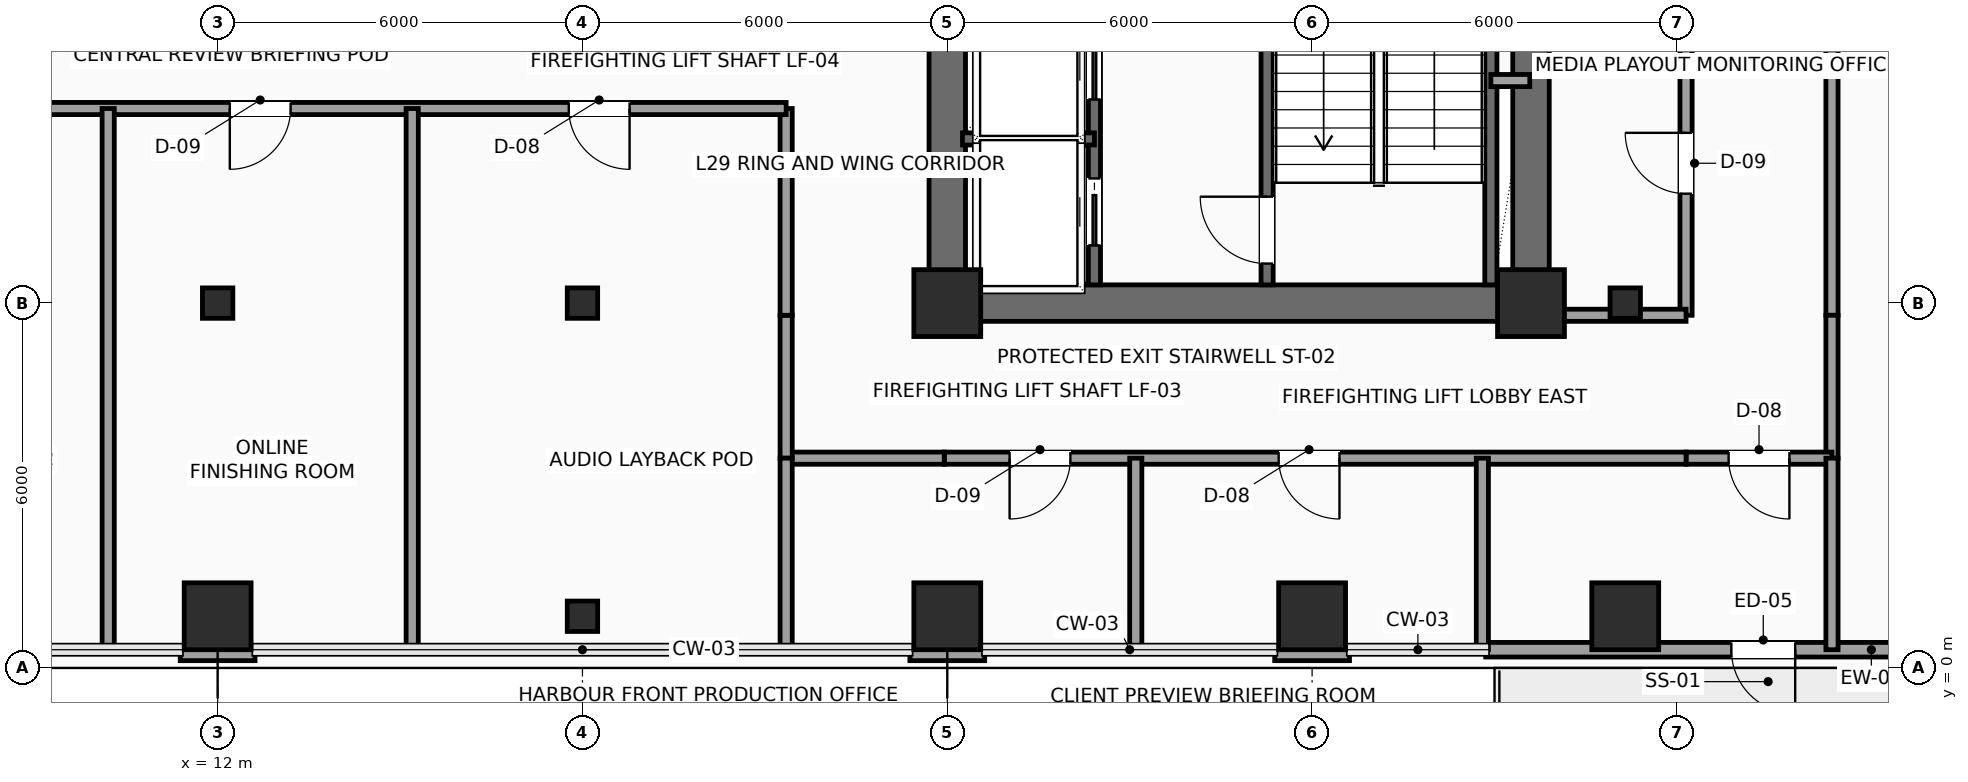
"""IFC4 building model, lengths in metres.
Left out: names, types, materials, properties, quantities, classifications, styles, units other than length and angle.
Written with IfcOpenShell. Run it as: python <this file> out.ifc"""

import sys

from ifc_helpers import new_model, si_unit, direction, frame, frame_2d, origin, origin_2d, place, context, subcontext, project, spatial, rectangle, hollow_rectangle, extrude, element, fill, save


model = new_model("IFC4")
c1 = context("Model", 3, precision=1e-05, world=origin(), true_north=direction((0.0, 1.0)))
c2 = subcontext(c1, "Body", "Model", "MODEL_VIEW")
j1 = project(units=[si_unit("LENGTHUNIT", "METRE"), si_unit("PLANEANGLEUNIT", "RADIAN")], contexts=[c1])
p1 = place(None, origin())
s1 = spatial("IfcSite", under=j1, at=p1, CompositionType="ELEMENT")
p2 = place(p1, origin())
s2 = spatial("IfcBuilding", under=s1, at=p2, CompositionType="ELEMENT")
p3 = place(p2, frame((0.0, 0.0, 123.15)))
s3 = spatial("IfcBuildingStorey", under=s2, at=p3, CompositionType="ELEMENT", Elevation=123.15)
for number, where, z_axis, x_axis in (
    (1, (24.0, 6.0, 0.0), (0.0, 0.0, 1.0), (1.0, 0.0, 0.0)),
    (2, (33.6, 6.0, 0.0), (0.0, 0.0, 1.0), (1.0, 0.0, 0.0)),
    (3, (12.0, 0.85, 0.0), (0.0, 0.0, 1.0), (1.0, 0.0, 0.0)),
):
    element("IfcColumn", number, at=place(p3, frame(where, z_axis=z_axis, x_axis=x_axis)), inside=s3, PredefinedType="COLUMN", context=c2, shape_type="SweptSolid", body=[
        extrude(rectangle(XDim=1.1, YDim=1.1, at=origin_2d()), origin(), (0.0, 0.0, 1.0), 3.75),
    ])
for number, where, z_axis, x_axis in (
    (4, (12.0, 6.0, 0.0), (0.0, 0.0, 1.0), (1.0, 0.0, 0.0)),
    (5, (18.0, 0.85, 0.0), (0.0, 0.0, 1.0), (1.0, 0.0, 0.0)),
    (6, (18.0, 6.0, 0.0), (0.0, 0.0, 1.0), (1.0, 0.0, 0.0)),
):
    element("IfcColumn", number, at=place(p3, frame(where, z_axis=z_axis, x_axis=x_axis)), inside=s3, PredefinedType="COLUMN", context=c2, shape_type="SweptSolid", body=[
        extrude(hollow_rectangle(XDim=0.5, YDim=0.5, WallThickness=0.025, InnerFilletRadius=0.025, OuterFilletRadius=0.04, at=origin_2d()), origin(), (0.0, 0.0, 1.0), 3.75),
    ])
for number, where, z_axis, x_axis in (
    (7, (24.0, 0.85, 0.0), (0.0, 0.0, 1.0), (1.0, 0.0, 0.0)),
    (8, (30.0, 0.85, 0.0), (0.0, 0.0, 1.0), (1.0, 0.0, 0.0)),
    (9, (35.15, 0.85, 0.0), (0.0, 0.0, 1.0), (1.0, 0.0, 0.0)),
):
    element("IfcColumn", number, at=place(p3, frame(where, z_axis=z_axis, x_axis=x_axis)), inside=s3, PredefinedType="COLUMN", context=c2, shape_type="SweptSolid", body=[
        extrude(rectangle(XDim=1.1, YDim=1.1, at=origin_2d()), origin(), (0.0, 0.0, 1.0), 3.75),
    ])
p4 = place(p3, frame((35.15, 6.0, 0.0), z_axis=(0.0, 0.0, 1.0), x_axis=(1.0, 0.0, 0.0)))
e10 = element("IfcColumn", 10, at=p4, inside=s3, PredefinedType="COLUMN", context=c2, shape_type="SweptSolid", body=[
    extrude(hollow_rectangle(XDim=0.5, YDim=0.5, WallThickness=0.025, InnerFilletRadius=0.025, OuterFilletRadius=0.04, at=origin_2d()), origin(), (0.0, 0.0, 1.0), 3.75),
])
p5 = place(p3, frame((42.145, 0.3, 0.0), z_axis=(0.0, 0.0, 1.0), x_axis=(-1.0, 0.0, 0.0)))
e11 = element("IfcWall", 11, at=p5, inside=s3, PredefinedType="SOLIDWALL", context=c2, shape_type="SweptSolid", body=[
    extrude(rectangle(XDim=9.29, YDim=0.24, at=frame_2d((4.645, 0.0))), origin(), (0.0, 0.0, 1.0), 3.525),
])
p6 = place(p5, frame((4.2, 0.0, 0.0)))
e12 = element("IfcOpeningElement", 12, at=p6, cuts=e11, PredefinedType="OPENING", context=c2, shape_type="SweptSolid", body=[
    extrude(rectangle(XDim=1.05, YDim=2.2, at=frame_2d((0.525, 1.1))), frame((0.0, 0.13, 0.0), z_axis=(0.0, -1.0, 0.0), x_axis=(1.0, 0.0, 0.0)), (0.0, 0.0, 1.0), 0.26),
])
for number, where, z_axis, x_axis in (
    (13, (30.615, 0.24, 0.0), (0.0, 0.0, 1.0), (-1.0, 0.0, 0.0)),
    (14, (24.615, 0.24, 0.0), (0.0, 0.0, 1.0), (-1.0, 0.0, 0.0)),
    (15, (12.615, 0.24, 0.0), (0.0, 0.0, 1.0), (-1.0, 0.0, 0.0)),
):
    element("IfcWall", number, at=place(p3, frame(where, z_axis=z_axis, x_axis=x_axis)), inside=s3, PredefinedType="SOLIDWALL", context=c2, shape_type="SweptSolid", body=[
        extrude(rectangle(XDim=1.23, YDim=0.24, at=frame_2d((0.615, 0.0))), origin(), (0.0, 0.0, 1.0), 3.525),
    ])
p7 = place(p3, frame((24.0, 6.0, 0.0), z_axis=(0.0, 0.0, 1.0), x_axis=(1.0, 0.0, 0.0)))
e16 = element("IfcWall", 16, at=p7, inside=s3, PredefinedType="SHEAR", context=c2, shape_type="SweptSolid", body=[
    extrude(rectangle(XDim=9.6, YDim=0.6, at=frame_2d((4.8, 0.0))), origin(), (0.0, 0.0, 1.0), 3.525),
])
p8 = place(p3, frame((24.0, 6.0, 0.0), z_axis=(0.0, 0.0, 1.0), x_axis=(0.0, 1.0, 0.0)))
e17 = element("IfcWall", 17, at=p8, inside=s3, PredefinedType="SHEAR", context=c2, shape_type="SweptSolid", body=[
    extrude(rectangle(XDim=12.0, YDim=0.6, at=frame_2d((6.0, 0.0))), origin(), (0.0, 0.0, 1.0), 3.525),
])
p9 = place(p8, frame((7.15, 0.0, 0.0)))
e18 = element("IfcOpeningElement", 18, at=p9, cuts=e17, PredefinedType="OPENING", context=c2, shape_type="SweptSolid", body=[
    extrude(rectangle(XDim=1.6, YDim=2.3, at=frame_2d((0.8, 1.15))), frame((0.0, 0.31, 0.0), z_axis=(0.0, -1.0, 0.0), x_axis=(1.0, 0.0, 0.0)), (0.0, 0.0, 1.0), 0.62),
])
p10 = place(p3, frame((33.6, 6.0, 0.0), z_axis=(0.0, 0.0, 1.0), x_axis=(0.0, 1.0, 0.0)))
e19 = element("IfcWall", 19, at=p10, inside=s3, PredefinedType="SHEAR", context=c2, shape_type="SweptSolid", body=[
    extrude(rectangle(XDim=12.0, YDim=0.6, at=frame_2d((6.0, 0.0))), origin(), (0.0, 0.0, 1.0), 3.525),
])
p11 = place(p10, frame((10.15, 0.0, 0.0)))
e20 = element("IfcOpeningElement", 20, at=p11, cuts=e19, PredefinedType="OPENING", context=c2, shape_type="SweptSolid", body=[
    extrude(rectangle(XDim=0.9, YDim=2.15, at=frame_2d((0.45, 1.075))), frame((0.0, 0.31, 0.0), z_axis=(0.0, -1.0, 0.0), x_axis=(1.0, 0.0, 0.0)), (0.0, 0.0, 1.0), 0.62),
])
p12 = place(p3, frame((29.26, 6.3, 0.0), z_axis=(0.0, 0.0, 1.0), x_axis=(0.0, 1.0, 0.0)))
e21 = element("IfcWall", 21, at=p12, inside=s3, PredefinedType="SHEAR", context=c2, shape_type="SweptSolid", body=[
    extrude(rectangle(XDim=8.88, YDim=0.2, at=frame_2d((4.44, 0.0))), origin(), (0.0, 0.0, 1.0), 3.525),
])
p13 = place(p12, frame((0.35, 0.0, 0.0)))
e22 = element("IfcOpeningElement", 22, at=p13, cuts=e21, PredefinedType="OPENING", context=c2, shape_type="SweptSolid", body=[
    extrude(rectangle(XDim=1.1, YDim=2.2, at=frame_2d((0.55, 1.1))), frame((0.0, 0.11, 0.0), z_axis=(0.0, -1.0, 0.0), x_axis=(1.0, 0.0, 0.0)), (0.0, 0.0, 1.0), 0.22),
])
p14 = place(p3, frame((32.94, 6.3, 0.0), z_axis=(0.0, 0.0, 1.0), x_axis=(0.0, 1.0, 0.0)))
e23 = element("IfcWall", 23, at=p14, inside=s3, PredefinedType="SHEAR", context=c2, shape_type="SweptSolid", body=[
    extrude(rectangle(XDim=8.88, YDim=0.2, at=frame_2d((4.44, 0.0))), origin(), (0.0, 0.0, 1.0), 3.525),
])
p15 = place(p3, frame((26.42, 6.3, 0.0), z_axis=(0.0, 0.0, 1.0), x_axis=(0.0, 1.0, 0.0)))
e24 = element("IfcWall", 24, at=p15, inside=s3, PredefinedType="SHEAR", context=c2, shape_type="SweptSolid", body=[
    extrude(rectangle(XDim=4.95, YDim=0.2, at=frame_2d((2.475, 0.0))), origin(), (0.0, 0.0, 1.0), 3.525),
])
p16 = place(p15, frame((0.65, 0.0, 0.0)))
e25 = element("IfcOpeningElement", 25, at=p16, cuts=e24, PredefinedType="OPENING", context=c2, shape_type="SweptSolid", body=[
    extrude(rectangle(XDim=1.1, YDim=2.2, at=frame_2d((0.55, 1.1))), frame((0.0, 0.11, 0.0), z_axis=(0.0, -1.0, 0.0), x_axis=(1.0, 0.0, 0.0)), (0.0, 0.0, 1.0), 0.22),
])
p17 = place(p15, frame((3.05, 0.0, 0.0)))
e26 = element("IfcOpeningElement", 26, at=p17, cuts=e24, PredefinedType="OPENING", context=c2, shape_type="SweptSolid", body=[
    extrude(rectangle(XDim=1.1, YDim=2.2, at=frame_2d((0.55, 1.1))), frame((0.0, 0.11, 0.0), z_axis=(0.0, -1.0, 0.0), x_axis=(1.0, 0.0, 0.0)), (0.0, 0.0, 1.0), 0.22),
])
p18 = place(p3, frame((24.25, 8.7, 0.0), z_axis=(0.0, 0.0, 1.0), x_axis=(1.0, 0.0, 0.0)))
e27 = element("IfcWall", 27, at=p18, inside=s3, PredefinedType="SHEAR", context=c2, shape_type="SweptSolid", body=[
    extrude(rectangle(XDim=2.17, YDim=0.2, at=frame_2d((1.085, 0.0))), origin(), (0.0, 0.0, 1.0), 3.525),
])
p19 = place(p3, frame((32.94, 9.66, 0.0), z_axis=(0.0, 0.0, 1.0), x_axis=(1.0, 0.0, 0.0)))
e28 = element("IfcWall", 28, at=p19, inside=s3, PredefinedType="SOLIDWALL", context=c2, shape_type="SweptSolid", body=[
    extrude(rectangle(XDim=0.64, YDim=0.2, at=frame_2d((0.32, 0.0))), origin(), (0.0, 0.0, 1.0), 3.525),
])
p20 = place(p3, frame((36.15, 5.8, 0.0), z_axis=(0.0, 0.0, 1.0), x_axis=(0.0, 1.0, 0.0)))
e29 = element("IfcWall", 29, at=p20, inside=s3, PredefinedType="SOLIDWALL", context=c2, shape_type="SweptSolid", body=[
    extrude(rectangle(XDim=10.08, YDim=0.2, at=frame_2d((5.04, 0.0))), origin(), (0.0, 0.0, 1.0), 3.525),
])
p21 = place(p20, frame((2.0, 0.0, 0.0)))
e30 = element("IfcOpeningElement", 30, at=p21, cuts=e29, PredefinedType="OPENING", context=c2, shape_type="SweptSolid", body=[
    extrude(rectangle(XDim=1.0, YDim=2.2, at=frame_2d((0.5, 1.1))), frame((0.0, 0.11, 0.0), z_axis=(0.0, -1.0, 0.0), x_axis=(1.0, 0.0, 0.0)), (0.0, 0.0, 1.0), 0.22),
])
p22 = place(p20, frame((7.04, 0.0, 0.0)))
e31 = element("IfcOpeningElement", 31, at=p22, cuts=e29, PredefinedType="OPENING", context=c2, shape_type="SweptSolid", body=[
    extrude(rectangle(XDim=1.0, YDim=2.2, at=frame_2d((0.5, 1.1))), frame((0.0, 0.11, 0.0), z_axis=(0.0, -1.0, 0.0), x_axis=(1.0, 0.0, 0.0)), (0.0, 0.0, 1.0), 0.22),
])
p23 = place(p3, frame((38.55, 14.2, 0.0), z_axis=(0.0, 0.0, 1.0), x_axis=(0.0, -1.0, 0.0)))
e32 = element("IfcWall", 32, at=p23, inside=s3, PredefinedType="SOLIDWALL", context=c2, shape_type="SweptSolid", body=[
    extrude(rectangle(XDim=8.4, YDim=0.2, at=frame_2d((4.2, 0.0))), origin(), (0.0, 0.0, 1.0), 3.525),
])
p24 = place(p3, frame((38.55, 5.8, 0.0), z_axis=(0.0, 0.0, 1.0), x_axis=(0.0, -1.0, 0.0)))
e33 = element("IfcWall", 33, at=p24, inside=s3, PredefinedType="SOLIDWALL", context=c2, shape_type="SweptSolid", body=[
    extrude(rectangle(XDim=2.35, YDim=0.2, at=frame_2d((1.175, 0.0))), origin(), (0.0, 0.0, 1.0), 3.525),
])
p25 = place(p3, frame((38.55, 3.45, 0.0), z_axis=(0.0, 0.0, 1.0), x_axis=(-1.0, 0.0, 0.0)))
e34 = element("IfcWall", 34, at=p25, inside=s3, PredefinedType="SOLIDWALL", context=c2, shape_type="SweptSolid", body=[
    extrude(rectangle(XDim=2.4, YDim=0.2, at=frame_2d((1.2, 0.0))), origin(), (0.0, 0.0, 1.0), 3.067),
])
p26 = place(p25, frame((0.7, 0.0, 0.0)))
e35 = element("IfcOpeningElement", 35, at=p26, cuts=e34, PredefinedType="OPENING", context=c2, shape_type="SweptSolid", body=[
    extrude(rectangle(XDim=1.0, YDim=2.2, at=frame_2d((0.5, 1.1))), frame((0.0, 0.11, 0.0), z_axis=(0.0, -1.0, 0.0), x_axis=(1.0, 0.0, 0.0)), (0.0, 0.0, 1.0), 0.22),
])
p27 = place(p3, frame((36.15, 3.45, 0.0), z_axis=(0.0, 0.0, 1.0), x_axis=(-1.0, 0.0, 0.0)))
e36 = element("IfcWall", 36, at=p27, inside=s3, PredefinedType="SOLIDWALL", context=c2, shape_type="SweptSolid", body=[
    extrude(rectangle(XDim=12.2, YDim=0.2, at=frame_2d((6.1, 0.0))), origin(), (0.0, 0.0, 1.0), 3.067),
])
p28 = place(p27, frame((10.125, 0.0, 0.0)))
e37 = element("IfcOpeningElement", 37, at=p28, cuts=e36, PredefinedType="OPENING", context=c2, shape_type="SweptSolid", body=[
    extrude(rectangle(XDim=1.0, YDim=2.2, at=frame_2d((0.5, 1.1))), frame((0.0, 0.11, 0.0), z_axis=(0.0, -1.0, 0.0), x_axis=(1.0, 0.0, 0.0)), (0.0, 0.0, 1.0), 0.22),
])
p29 = place(p27, frame((5.7, 0.0, 0.0)))
e38 = element("IfcOpeningElement", 38, at=p29, cuts=e36, PredefinedType="OPENING", context=c2, shape_type="SweptSolid", body=[
    extrude(rectangle(XDim=1.0, YDim=2.2, at=frame_2d((0.5, 1.1))), frame((0.0, 0.11, 0.0), z_axis=(0.0, -1.0, 0.0), x_axis=(1.0, 0.0, 0.0)), (0.0, 0.0, 1.0), 0.22),
])
p30 = place(p3, frame((23.95, 3.45, 0.0), z_axis=(0.0, 0.0, 1.0), x_axis=(-1.0, 0.0, 0.0)))
e39 = element("IfcWall", 39, at=p30, inside=s3, PredefinedType="SOLIDWALL", context=c2, shape_type="SweptSolid", body=[
    extrude(rectangle(XDim=2.6, YDim=0.2, at=frame_2d((1.3, 0.0))), origin(), (0.0, 0.0, 1.0), 3.067),
])
p31 = place(p3, frame((21.35, 3.45, 0.0), z_axis=(0.0, 0.0, 1.0), x_axis=(0.0, 1.0, 0.0)))
e40 = element("IfcWall", 40, at=p31, inside=s3, PredefinedType="SOLIDWALL", context=c2, shape_type="SweptSolid", body=[
    extrude(rectangle(XDim=2.35, YDim=0.2, at=frame_2d((1.175, 0.0))), origin(), (0.0, 0.0, 1.0), 3.525),
])
p32 = place(p3, frame((21.35, 5.8, 0.0), z_axis=(0.0, 0.0, 1.0), x_axis=(0.0, 1.0, 0.0)))
e41 = element("IfcWall", 41, at=p32, inside=s3, PredefinedType="SOLIDWALL", context=c2, shape_type="SweptSolid", body=[
    extrude(rectangle(XDim=3.4, YDim=0.2, at=frame_2d((1.7, 0.0))), origin(), (0.0, 0.0, 1.0), 3.525),
])
p33 = place(p3, frame((21.35, 9.2, 0.0), z_axis=(0.0, 0.0, 1.0), x_axis=(-1.0, 0.0, 0.0)))
e42 = element("IfcWall", 42, at=p33, inside=s3, PredefinedType="SOLIDWALL", context=c2, shape_type="SweptSolid", body=[
    extrude(rectangle(XDim=18.15, YDim=0.2, at=frame_2d((9.075, 0.0))), origin(), (0.0, 0.0, 1.0), 3.067),
])
p34 = place(p33, frame((16.65, 0.0, 0.0)))
e43 = element("IfcOpeningElement", 43, at=p34, cuts=e42, PredefinedType="OPENING", context=c2, shape_type="SweptSolid", body=[
    extrude(rectangle(XDim=1.0, YDim=2.2, at=frame_2d((0.5, 1.1))), frame((0.0, 0.11, 0.0), z_axis=(0.0, -1.0, 0.0), x_axis=(1.0, 0.0, 0.0)), (0.0, 0.0, 1.0), 0.22),
])
p35 = place(p33, frame((13.15, 0.0, 0.0)))
e44 = element("IfcOpeningElement", 44, at=p35, cuts=e42, PredefinedType="OPENING", context=c2, shape_type="SweptSolid", body=[
    extrude(rectangle(XDim=1.0, YDim=2.2, at=frame_2d((0.5, 1.1))), frame((0.0, 0.11, 0.0), z_axis=(0.0, -1.0, 0.0), x_axis=(1.0, 0.0, 0.0)), (0.0, 0.0, 1.0), 0.22),
])
p36 = place(p33, frame((8.15, 0.0, 0.0)))
e45 = element("IfcOpeningElement", 45, at=p36, cuts=e42, PredefinedType="OPENING", context=c2, shape_type="SweptSolid", body=[
    extrude(rectangle(XDim=1.0, YDim=2.2, at=frame_2d((0.5, 1.1))), frame((0.0, 0.11, 0.0), z_axis=(0.0, -1.0, 0.0), x_axis=(1.0, 0.0, 0.0)), (0.0, 0.0, 1.0), 0.22),
])
p37 = place(p33, frame((2.575, 0.0, 0.0)))
e46 = element("IfcOpeningElement", 46, at=p37, cuts=e42, PredefinedType="OPENING", context=c2, shape_type="SweptSolid", body=[
    extrude(rectangle(XDim=1.0, YDim=2.2, at=frame_2d((0.5, 1.1))), frame((0.0, 0.11, 0.0), z_axis=(0.0, -1.0, 0.0), x_axis=(1.0, 0.0, 0.0)), (0.0, 0.0, 1.0), 0.22),
])
for number, where, z_axis, x_axis in (
    (47, (21.35, 0.3, 0.0), (0.0, 0.0, 1.0), (0.0, 1.0, 0.0)),
    (48, (27.1, 0.3, 0.0), (0.0, 0.0, 1.0), (0.0, 1.0, 0.0)),
    (49, (32.8, 0.3, 0.0), (0.0, 0.0, 1.0), (0.0, 1.0, 0.0)),
    (50, (38.55, 0.3, 0.0), (0.0, 0.0, 1.0), (0.0, 1.0, 0.0)),
):
    element("IfcWall", number, at=place(p3, frame(where, z_axis=z_axis, x_axis=x_axis)), inside=s3, PredefinedType="PARTITIONING", context=c2, shape_type="SweptSolid", body=[
        extrude(rectangle(XDim=3.15, YDim=0.2, at=frame_2d((1.575, 0.0))), origin(), (0.0, 0.0, 1.0), 3.525),
    ])
p38 = place(p3, frame((33.65, 5.8, 0.0), z_axis=(0.0, 0.0, 1.0), x_axis=(1.0, 0.0, 0.0)))
e51 = element("IfcWall", 51, at=p38, inside=s3, PredefinedType="PARTITIONING", context=c2, shape_type="SweptSolid", body=[
    extrude(rectangle(XDim=2.5, YDim=0.2, at=frame_2d((1.25, 0.0))), origin(), (0.0, 0.0, 1.0), 3.017),
])
for number, where, z_axis, x_axis in (
    (52, (10.2, 0.3, 0.0), (0.0, 0.0, 1.0), (0.0, 1.0, 0.0)),
    (53, (15.2, 0.3, 0.0), (0.0, 0.0, 1.0), (0.0, 1.0, 0.0)),
):
    element("IfcWall", number, at=place(p3, frame(where, z_axis=z_axis, x_axis=x_axis)), inside=s3, PredefinedType="PARTITIONING", context=c2, shape_type="SweptSolid", body=[
        extrude(rectangle(XDim=8.9, YDim=0.2, at=frame_2d((4.45, 0.0))), origin(), (0.0, 0.0, 1.0), 3.525),
    ])
p39 = place(p6, origin())
e54 = element("IfcDoor", 54, at=p39, inside=s3, OperationType="SINGLE_SWING_LEFT", PredefinedType="DOOR", context=c2, shape_type="SweptSolid", body=[
    extrude(rectangle(XDim=1.05, YDim=2.2, at=frame_2d((0.525, 1.1))), frame((0.0, 0.025, 0.0), z_axis=(0.0, -1.0, 0.0), x_axis=(1.0, 0.0, 0.0)), (0.0, 0.0, 1.0), 0.05),
])
fill(e12, e54)
p40 = place(p13, origin())
e55 = element("IfcDoor", 55, at=p40, inside=s3, OperationType="SINGLE_SWING_RIGHT", PredefinedType="DOOR", context=c2, shape_type="SweptSolid", body=[
    extrude(rectangle(XDim=1.1, YDim=2.2, at=frame_2d((0.55, 1.1))), frame((0.0, 0.025, 0.0), z_axis=(0.0, -1.0, 0.0), x_axis=(1.0, 0.0, 0.0)), (0.0, 0.0, 1.0), 0.05),
])
fill(e22, e55)
p41 = place(p16, origin())
e56 = element("IfcDoor", 56, at=p41, inside=s3, OperationType="SLIDING_TO_LEFT", PredefinedType="DOOR", context=c2, shape_type="SweptSolid", body=[
    extrude(rectangle(XDim=1.1, YDim=2.2, at=frame_2d((0.55, 1.1))), frame((0.0, 0.025, 0.0), z_axis=(0.0, -1.0, 0.0), x_axis=(1.0, 0.0, 0.0)), (0.0, 0.0, 1.0), 0.05),
])
fill(e25, e56)
p42 = place(p17, origin())
e57 = element("IfcDoor", 57, at=p42, inside=s3, OperationType="SLIDING_TO_LEFT", PredefinedType="DOOR", context=c2, shape_type="SweptSolid", body=[
    extrude(rectangle(XDim=1.1, YDim=2.2, at=frame_2d((0.55, 1.1))), frame((0.0, 0.025, 0.0), z_axis=(0.0, -1.0, 0.0), x_axis=(1.0, 0.0, 0.0)), (0.0, 0.0, 1.0), 0.05),
])
fill(e26, e57)
p43 = place(p21, origin())
e58 = element("IfcDoor", 58, at=p43, inside=s3, OperationType="SINGLE_SWING_RIGHT", PredefinedType="DOOR", context=c2, shape_type="SweptSolid", body=[
    extrude(rectangle(XDim=1.0, YDim=2.2, at=frame_2d((0.5, 1.1))), frame((0.0, 0.025, 0.0), z_axis=(0.0, -1.0, 0.0), x_axis=(1.0, 0.0, 0.0)), (0.0, 0.0, 1.0), 0.05),
])
fill(e30, e58)
p44 = place(p26, origin())
e59 = element("IfcDoor", 59, at=p44, inside=s3, OperationType="SINGLE_SWING_LEFT", PredefinedType="DOOR", context=c2, shape_type="SweptSolid", body=[
    extrude(rectangle(XDim=1.0, YDim=2.2, at=frame_2d((0.5, 1.1))), frame((0.0, 0.025, 0.0), z_axis=(0.0, -1.0, 0.0), x_axis=(1.0, 0.0, 0.0)), (0.0, 0.0, 1.0), 0.05),
])
fill(e35, e59)
p45 = place(p28, origin())
e60 = element("IfcDoor", 60, at=p45, inside=s3, OperationType="SINGLE_SWING_RIGHT", PredefinedType="DOOR", context=c2, shape_type="SweptSolid", body=[
    extrude(rectangle(XDim=1.0, YDim=2.2, at=frame_2d((0.5, 1.1))), frame((0.0, 0.025, 0.0), z_axis=(0.0, -1.0, 0.0), x_axis=(1.0, 0.0, 0.0)), (0.0, 0.0, 1.0), 0.05),
])
fill(e37, e60)
p46 = place(p29, origin())
e61 = element("IfcDoor", 61, at=p46, inside=s3, OperationType="SINGLE_SWING_LEFT", PredefinedType="DOOR", context=c2, shape_type="SweptSolid", body=[
    extrude(rectangle(XDim=1.0, YDim=2.2, at=frame_2d((0.5, 1.1))), frame((0.0, 0.025, 0.0), z_axis=(0.0, -1.0, 0.0), x_axis=(1.0, 0.0, 0.0)), (0.0, 0.0, 1.0), 0.05),
])
fill(e38, e61)
p47 = place(p36, origin())
e62 = element("IfcDoor", 62, at=p47, inside=s3, OperationType="SINGLE_SWING_RIGHT", PredefinedType="DOOR", context=c2, shape_type="SweptSolid", body=[
    extrude(rectangle(XDim=1.0, YDim=2.2, at=frame_2d((0.5, 1.1))), frame((0.0, 0.025, 0.0), z_axis=(0.0, -1.0, 0.0), x_axis=(1.0, 0.0, 0.0)), (0.0, 0.0, 1.0), 0.05),
])
fill(e45, e62)
p48 = place(p37, origin())
e63 = element("IfcDoor", 63, at=p48, inside=s3, OperationType="SINGLE_SWING_LEFT", PredefinedType="DOOR", context=c2, shape_type="SweptSolid", body=[
    extrude(rectangle(XDim=1.0, YDim=2.2, at=frame_2d((0.5, 1.1))), frame((0.0, 0.025, 0.0), z_axis=(0.0, -1.0, 0.0), x_axis=(1.0, 0.0, 0.0)), (0.0, 0.0, 1.0), 0.05),
])
fill(e46, e63)
save(model, sys.argv[1])
